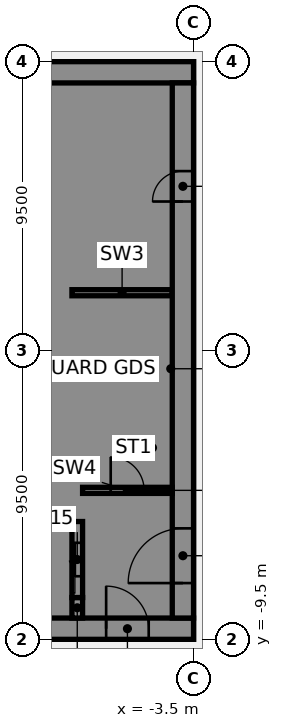
"""IFC4 building model, lengths in metres.
Left out: names, types, materials, properties, quantities, classifications, styles, units other than length and angle.
Written with IfcOpenShell. Run it as: python <this file> out.ifc"""

import sys

from ifc_helpers import new_model, si_unit, direction, frame, frame_2d, origin, place, context, subcontext, project, spatial, polyline, rectangle, outline, extrude, element, fill, save


model = new_model("IFC4")
c1 = context("Model", 3, precision=1e-05, world=origin(), true_north=direction((0.0, 1.0)))
c2 = subcontext(c1, "Body", "Model", "MODEL_VIEW")
j1 = project(units=[si_unit("LENGTHUNIT", "METRE"), si_unit("PLANEANGLEUNIT", "RADIAN")], contexts=[c1])
p1 = place(None, origin())
s1 = spatial("IfcSite", under=j1, at=p1, CompositionType="ELEMENT")
p2 = place(p1, origin())
s2 = spatial("IfcBuilding", under=s1, at=p2, CompositionType="ELEMENT")
p3 = place(p2, frame((0.0, 0.0, 67.75)))
s3 = spatial("IfcBuildingStorey", under=s2, at=p3, CompositionType="ELEMENT", Elevation=67.75)
p4 = place(p3, frame((-16.5, -9.15, 0.0), z_axis=(0.0, 0.0, 1.0), x_axis=(1.0, 0.0, 0.0)))
e1 = element("IfcWall", 1, at=p4, inside=s3, PredefinedType="SHEAR", context=c2, shape_type="SweptSolid", body=[
    extrude(rectangle(XDim=13.0, YDim=0.7, at=frame_2d((6.5, 0.0))), origin(), (0.0, 0.0, 1.0), 3.61),
])
p5 = place(p4, frame((4.15, 0.0, 0.0)))
e2 = element("IfcOpeningElement", 2, at=p5, cuts=e1, PredefinedType="OPENING", context=c2, shape_type="SweptSolid", body=[
    extrude(rectangle(XDim=1.4, YDim=2.1, at=frame_2d((0.7, 1.05))), frame((0.0, 0.36, 0.0), z_axis=(0.0, -1.0, 0.0), x_axis=(1.0, 0.0, 0.0)), (0.0, 0.0, 1.0), 0.72),
])
p6 = place(p4, frame((10.125, 0.0, 0.0)))
e3 = element("IfcOpeningElement", 3, at=p6, cuts=e1, PredefinedType="OPENING", context=c2, shape_type="SweptSolid", body=[
    extrude(rectangle(XDim=1.4, YDim=2.1, at=frame_2d((0.7, 1.05))), frame((0.0, 0.36, 0.0), z_axis=(0.0, -1.0, 0.0), x_axis=(1.0, 0.0, 0.0)), (0.0, 0.0, 1.0), 0.72),
])
p7 = place(p3, frame((-16.5, 9.15, 0.0), z_axis=(0.0, 0.0, 1.0), x_axis=(1.0, 0.0, 0.0)))
e4 = element("IfcWall", 4, at=p7, inside=s3, PredefinedType="SHEAR", context=c2, shape_type="SweptSolid", body=[
    extrude(rectangle(XDim=13.0, YDim=0.7, at=frame_2d((6.5, 0.0))), origin(), (0.0, 0.0, 1.0), 3.61),
])
p8 = place(p3, origin())
e5 = element("IfcWall", 5, at=p8, inside=s3, PredefinedType="SHEAR", context=c2, shape_type="SweptSolid", body=[
    extrude(outline(polyline([(-9.8, -5.375), (-9.8, -5.625), (-7.5, -5.625), (-7.15, -5.625), (-7.15, 8.8), (-7.5, 8.8), (-9.8, 8.8), (-9.8, 8.125), (-7.5, 8.125), (-7.5, 5.625), (-9.8, 5.625), (-9.8, 5.375), (-7.5, 5.375), (-7.5, 2.875), (-9.8, 2.875), (-9.8, 2.625), (-7.5, 2.625), (-7.5, 0.125), (-9.8, 0.125), (-9.8, -0.125), (-7.5, -0.125), (-7.5, -2.625), (-9.8, -2.625), (-9.8, -2.875), (-7.5, -2.875), (-7.5, -5.375), (-9.8, -5.375)])), origin(), (0.0, 0.0, 1.0), 3.61),
])
p9 = place(p3, origin())
e6 = element("IfcWall", 6, at=p9, inside=s3, PredefinedType="SHEAR", context=c2, shape_type="SweptSolid", body=[
    extrude(outline(polyline([(-7.5, -8.125), (-9.55, -8.125), (-9.55, -5.625), (-9.8, -5.625), (-9.8, -8.125), (-9.8, -8.8), (-7.5, -8.8), (-7.5, -8.125)])), origin(), (0.0, 0.0, 1.0), 3.61),
])
p10 = place(p3, frame((-7.325, -8.8, 0.0), z_axis=(0.0, 0.0, 1.0), x_axis=(0.0, 1.0, 0.0)))
e7 = element("IfcWall", 7, at=p10, inside=s3, PredefinedType="SHEAR", context=c2, shape_type="SweptSolid", body=[
    extrude(rectangle(XDim=0.675, YDim=0.35, at=frame_2d((0.337, 0.0))), origin(), (0.0, 0.0, 1.0), 3.61),
])
p11 = place(p3, frame((-7.5, 1.9, 0.0), z_axis=(0.0, 0.0, 1.0), x_axis=(1.0, 0.0, 0.0)))
e8 = element("IfcWall", 8, at=p11, inside=s3, PredefinedType="SHEAR", context=c2, shape_type="SweptSolid", body=[
    extrude(rectangle(XDim=3.3, YDim=0.2, at=frame_2d((1.65, 0.0))), origin(), (0.0, 0.0, 1.0), 3.61),
])
p12 = place(p3, frame((-7.325, -8.125, 0.0), z_axis=(0.0, 0.0, 1.0), x_axis=(0.0, 1.0, 0.0)))
e9 = element("IfcWall", 9, at=p12, inside=s3, PredefinedType="SHEAR", context=c2, shape_type="SweptSolid", body=[
    extrude(rectangle(XDim=2.5, YDim=0.35, at=frame_2d((1.25, 0.0))), origin(), (0.0, 0.0, 1.0), 3.61),
])
p13 = place(p12, frame((0.7, 0.0, 0.0)))
e10 = element("IfcOpeningElement", 10, at=p13, cuts=e9, PredefinedType="OPENING", context=c2, shape_type="SweptSolid", body=[
    extrude(rectangle(XDim=1.1, YDim=2.1, at=frame_2d((0.55, 1.05))), frame((0.0, 0.185, 0.0), z_axis=(0.0, -1.0, 0.0), x_axis=(1.0, 0.0, 0.0)), (0.0, 0.0, 1.0), 0.37),
])
p14 = place(p3, frame((-3.85, -8.8, 0.0), z_axis=(0.0, 0.0, 1.0), x_axis=(0.0, 1.0, 0.0)))
e11 = element("IfcWall", 11, at=p14, inside=s3, PredefinedType="SHEAR", context=c2, shape_type="SweptSolid", body=[
    extrude(rectangle(XDim=17.6, YDim=0.7, at=frame_2d((8.8, 0.0))), origin(), (0.0, 0.0, 1.0), 3.61),
])
p15 = place(p14, frame((1.15, 0.0, 0.0)))
e12 = element("IfcOpeningElement", 12, at=p15, cuts=e11, PredefinedType="OPENING", context=c2, shape_type="SweptSolid", body=[
    extrude(rectangle(XDim=1.8, YDim=2.1, at=frame_2d((0.9, 1.05))), frame((0.0, 0.36, 0.0), z_axis=(0.0, -1.0, 0.0), x_axis=(1.0, 0.0, 0.0)), (0.0, 0.0, 1.0), 0.72),
])
p16 = place(p14, frame((13.7, 0.0, 0.0)))
e13 = element("IfcOpeningElement", 13, at=p16, cuts=e11, PredefinedType="OPENING", context=c2, shape_type="SweptSolid", body=[
    extrude(rectangle(XDim=1.0, YDim=2.1, at=frame_2d((0.5, 1.05))), frame((0.0, 0.36, 0.0), z_axis=(0.0, -1.0, 0.0), x_axis=(1.0, 0.0, 0.0)), (0.0, 0.0, 1.0), 0.72),
])
p17 = place(p3, frame((-7.15, -4.6, 0.0), z_axis=(0.0, 0.0, 1.0), x_axis=(1.0, 0.0, 0.0)))
e14 = element("IfcWall", 14, at=p17, inside=s3, PredefinedType="SHEAR", context=c2, shape_type="SweptSolid", body=[
    extrude(rectangle(XDim=2.95, YDim=0.2, at=frame_2d((1.475, 0.0))), origin(), (0.0, 0.0, 1.0), 3.61),
])
p18 = place(p17, frame((0.925, 0.0, 0.0)))
e15 = element("IfcOpeningElement", 15, at=p18, cuts=e14, PredefinedType="OPENING", context=c2, shape_type="SweptSolid", body=[
    extrude(rectangle(XDim=1.1, YDim=2.1, at=frame_2d((0.55, 1.05))), frame((0.0, 0.11, 0.0), z_axis=(0.0, -1.0, 0.0), x_axis=(1.0, 0.0, 0.0)), (0.0, 0.0, 1.0), 0.22),
])
p19 = place(p6, origin())
e16 = element("IfcDoor", 16, at=p19, inside=s3, OperationType="SINGLE_SWING_LEFT", PredefinedType="DOOR", context=c2, shape_type="SweptSolid", body=[
    extrude(rectangle(XDim=1.4, YDim=2.1, at=frame_2d((0.7, 1.05))), frame((0.0, 0.025, 0.0), z_axis=(0.0, -1.0, 0.0), x_axis=(1.0, 0.0, 0.0)), (0.0, 0.0, 1.0), 0.05),
])
fill(e3, e16)
p20 = place(p15, origin())
e17 = element("IfcDoor", 17, at=p20, inside=s3, OperationType="SINGLE_SWING_LEFT", PredefinedType="DOOR", context=c2, shape_type="SweptSolid", body=[
    extrude(rectangle(XDim=1.8, YDim=2.1, at=frame_2d((0.9, 1.05))), frame((0.0, 0.025, 0.0), z_axis=(0.0, -1.0, 0.0), x_axis=(1.0, 0.0, 0.0)), (0.0, 0.0, 1.0), 0.05),
])
fill(e12, e17)
p21 = place(p16, origin())
e18 = element("IfcDoor", 18, at=p21, inside=s3, OperationType="SINGLE_SWING_LEFT", PredefinedType="DOOR", context=c2, shape_type="SweptSolid", body=[
    extrude(rectangle(XDim=1.0, YDim=2.1, at=frame_2d((0.5, 1.05))), frame((0.0, 0.025, 0.0), z_axis=(0.0, -1.0, 0.0), x_axis=(1.0, 0.0, 0.0)), (0.0, 0.0, 1.0), 0.05),
])
fill(e13, e18)
p22 = place(p18, origin())
e19 = element("IfcDoor", 19, at=p22, inside=s3, OperationType="SINGLE_SWING_LEFT", PredefinedType="DOOR", context=c2, shape_type="SweptSolid", body=[
    extrude(rectangle(XDim=1.1, YDim=2.1, at=frame_2d((0.55, 1.05))), frame((0.0, 0.025, 0.0), z_axis=(0.0, -1.0, 0.0), x_axis=(1.0, 0.0, 0.0)), (0.0, 0.0, 1.0), 0.05),
])
fill(e15, e19)
p23 = place(p13, origin())
e20 = element("IfcDoor", 20, at=p23, inside=s3, OperationType="SLIDING_TO_LEFT", PredefinedType="DOOR", context=c2, shape_type="SweptSolid", body=[
    extrude(rectangle(XDim=1.1, YDim=2.1, at=frame_2d((0.55, 1.05))), frame((0.0, 0.025, 0.0), z_axis=(0.0, -1.0, 0.0), x_axis=(1.0, 0.0, 0.0)), (0.0, 0.0, 1.0), 0.05),
])
fill(e10, e20)
save(model, sys.argv[1])
